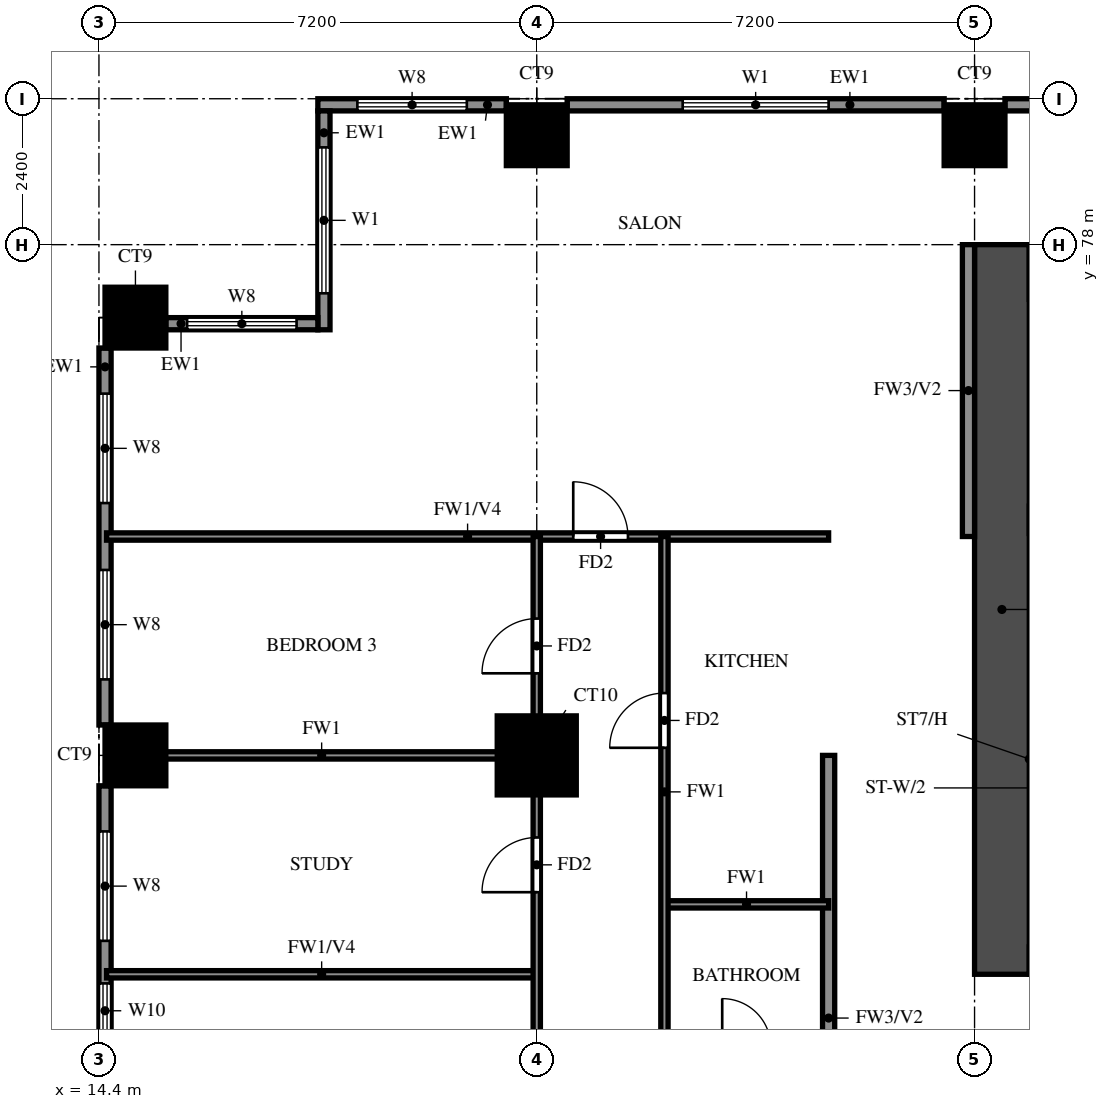
"""IFC4 building model, lengths in metres.
Left out: names, types, materials, properties, quantities, classifications, styles, units other than length and angle.
Written with IfcOpenShell. Run it as: python <this file> out.ifc"""

import sys

from ifc_helpers import new_model, si_unit, direction, frame, frame_2d, origin, origin_2d, place, context, subcontext, project, spatial, rectangle, extrude, source, transform, mapped, element, fill, save


model = new_model("IFC4")
c1 = context("Model", 3, precision=1e-05, world=origin(), true_north=direction((0.0, 1.0)))
c2 = subcontext(c1, "Body", "Model", "MODEL_VIEW")
j1 = project(units=[si_unit("LENGTHUNIT", "METRE"), si_unit("PLANEANGLEUNIT", "RADIAN")], contexts=[c1])
p1 = place(None, origin())
s1 = spatial("IfcSite", under=j1, at=p1, CompositionType="ELEMENT")
p2 = place(p1, origin())
s2 = spatial("IfcBuilding", under=s1, at=p2, CompositionType="ELEMENT")
p3 = place(p2, frame((0.0, 0.0, 65.5)))
s3 = spatial("IfcBuildingStorey", under=s2, at=p3, CompositionType="ELEMENT", Elevation=65.5)
m1 = source(origin(), c2, "Body", "SweptSolid", [
    extrude(rectangle(XDim=1.0, YDim=1.0, at=origin_2d()), origin(), (0.0, 0.0, 1.0), 3.18),
])
p4 = place(p3, frame((15.0, 69.6, 0.0), z_axis=(0.0, 0.0, 1.0), x_axis=(1.0, 0.0, 0.0)))
e1 = element("IfcColumn", 1, at=p4, inside=s3, PredefinedType="COLUMN", context=c2, shape_type="MappedRepresentation", body=[
    mapped(m1, transform((0.0, 0.0, 0.0))),
])
m2 = source(origin(), c2, "Body", "SweptSolid", [
    extrude(rectangle(XDim=1.3, YDim=1.3, at=origin_2d()), origin(), (0.0, 0.0, 1.0), 3.18),
])
p5 = place(p3, frame((21.6, 69.6, 0.0), z_axis=(0.0, 0.0, 1.0), x_axis=(1.0, 0.0, 0.0)))
e2 = element("IfcColumn", 2, at=p5, inside=s3, PredefinedType="COLUMN", context=c2, shape_type="MappedRepresentation", body=[
    mapped(m2, transform((0.0, 0.0, 0.0))),
])
for number, where, z_axis, x_axis in (
    (3, (15.0, 76.8, 0.0), (0.0, 0.0, 1.0), (1.0, 0.0, 0.0)),
    (4, (21.6, 79.8, 0.0), (0.0, 0.0, 1.0), (1.0, 0.0, 0.0)),
    (5, (28.8, 79.8, 0.0), (0.0, 0.0, 1.0), (1.0, 0.0, 0.0)),
):
    element("IfcColumn", number, at=place(p3, frame(where, z_axis=z_axis, x_axis=x_axis)), inside=s3, PredefinedType="COLUMN", context=c2, shape_type="MappedRepresentation", body=[
        mapped(m1, transform((0.0, 0.0, 0.0))),
    ])
p6 = place(p3, frame((29.25, 66.0, 0.0), z_axis=(0.0, 0.0, 1.0), x_axis=(0.0, 1.0, 0.0)))
e6 = element("IfcWall", 6, at=p6, inside=s3, PredefinedType="SHEAR", context=c2, shape_type="SweptSolid", body=[
    extrude(rectangle(XDim=12.0, YDim=0.9, at=frame_2d((6.0, 0.0))), origin(), (0.0, 0.0, 1.0), 3.18),
])
p7 = place(p3, frame((29.7, 73.475, 0.0), z_axis=(0.0, 0.0, 1.0), x_axis=(1.0, 0.0, 0.0)))
e7 = element("IfcWall", 7, at=p7, inside=s3, PredefinedType="SHEAR", context=c2, shape_type="SweptSolid", body=[
    extrude(rectangle(XDim=3.175, YDim=0.45, at=frame_2d((1.587, 0.0))), origin(), (0.0, 0.0, 1.0), 3.18),
])
p8 = place(p3, frame((35.5, 80.3, 0.0), z_axis=(0.0, 0.0, 1.0), x_axis=(-1.0, 0.0, 0.0)))
e8 = element("IfcWall", 8, at=p8, inside=s3, PredefinedType="SOLIDWALL", context=c2, shape_type="SweptSolid", body=[
    extrude(rectangle(XDim=6.2, YDim=0.2, at=frame_2d((3.1, 0.0))), origin(), (0.0, 0.0, 1.0), 3.18),
])
p9 = place(p3, frame((28.3, 80.3, 0.0), z_axis=(0.0, 0.0, 1.0), x_axis=(-1.0, 0.0, 0.0)))
e9 = element("IfcWall", 9, at=p9, inside=s3, PredefinedType="SOLIDWALL", context=c2, shape_type="SweptSolid", body=[
    extrude(rectangle(XDim=6.2, YDim=0.2, at=frame_2d((3.1, 0.0))), origin(), (0.0, 0.0, 1.0), 3.18),
])
p10 = place(p9, frame((1.9, 0.0, 0.6)))
e10 = element("IfcOpeningElement", 10, at=p10, cuts=e9, PredefinedType="OPENING", context=c2, shape_type="SweptSolid", body=[
    extrude(rectangle(XDim=2.4, YDim=2.4, at=frame_2d((1.2, 1.2))), frame((0.0, 0.11, 0.0), z_axis=(0.0, -1.0, 0.0), x_axis=(1.0, 0.0, 0.0)), (0.0, 0.0, 1.0), 0.22),
])
p11 = place(p3, frame((21.1, 80.3, 0.0), z_axis=(0.0, 0.0, 1.0), x_axis=(-1.0, 0.0, 0.0)))
e11 = element("IfcWall", 11, at=p11, inside=s3, PredefinedType="SOLIDWALL", context=c2, shape_type="SweptSolid", body=[
    extrude(rectangle(XDim=3.1, YDim=0.2, at=frame_2d((1.55, 0.0))), origin(), (0.0, 0.0, 1.0), 3.18),
])
p12 = place(p11, frame((0.65, 0.0, 0.6)))
e12 = element("IfcOpeningElement", 12, at=p12, cuts=e11, PredefinedType="OPENING", context=c2, shape_type="SweptSolid", body=[
    extrude(rectangle(XDim=1.8, YDim=2.4, at=frame_2d((0.9, 1.2))), frame((0.0, 0.11, 0.0), z_axis=(0.0, -1.0, 0.0), x_axis=(1.0, 0.0, 0.0)), (0.0, 0.0, 1.0), 0.22),
])
p13 = place(p3, frame((18.1, 80.2, 0.0), z_axis=(0.0, 0.0, 1.0), x_axis=(0.0, -1.0, 0.0)))
e13 = element("IfcWall", 13, at=p13, inside=s3, PredefinedType="SOLIDWALL", context=c2, shape_type="SweptSolid", body=[
    extrude(rectangle(XDim=3.6, YDim=0.2, at=frame_2d((1.8, 0.0))), origin(), (0.0, 0.0, 1.0), 3.18),
])
p14 = place(p13, frame((0.6, 0.0, 0.6)))
e14 = element("IfcOpeningElement", 14, at=p14, cuts=e13, PredefinedType="OPENING", context=c2, shape_type="SweptSolid", body=[
    extrude(rectangle(XDim=2.4, YDim=2.4, at=frame_2d((1.2, 1.2))), frame((0.0, 0.11, 0.0), z_axis=(0.0, -1.0, 0.0), x_axis=(1.0, 0.0, 0.0)), (0.0, 0.0, 1.0), 0.22),
])
p15 = place(p3, frame((18.0, 76.7, 0.0), z_axis=(0.0, 0.0, 1.0), x_axis=(-1.0, 0.0, 0.0)))
e15 = element("IfcWall", 15, at=p15, inside=s3, PredefinedType="SOLIDWALL", context=c2, shape_type="SweptSolid", body=[
    extrude(rectangle(XDim=2.5, YDim=0.2, at=frame_2d((1.25, 0.0))), origin(), (0.0, 0.0, 1.0), 3.18),
])
p16 = place(p15, frame((0.35, 0.0, 0.6)))
e16 = element("IfcOpeningElement", 16, at=p16, cuts=e15, PredefinedType="OPENING", context=c2, shape_type="SweptSolid", body=[
    extrude(rectangle(XDim=1.8, YDim=2.4, at=frame_2d((0.9, 1.2))), frame((0.0, 0.11, 0.0), z_axis=(0.0, -1.0, 0.0), x_axis=(1.0, 0.0, 0.0)), (0.0, 0.0, 1.0), 0.22),
])
p17 = place(p3, frame((14.5, 76.3, 0.0), z_axis=(0.0, 0.0, 1.0), x_axis=(0.0, -1.0, 0.0)))
e17 = element("IfcWall", 17, at=p17, inside=s3, PredefinedType="SOLIDWALL", context=c2, shape_type="SweptSolid", body=[
    extrude(rectangle(XDim=6.2, YDim=0.2, at=frame_2d((3.1, 0.0))), origin(), (0.0, 0.0, 1.0), 3.18),
])
p18 = place(p17, frame((3.65, 0.0, 0.6)))
e18 = element("IfcOpeningElement", 18, at=p18, cuts=e17, PredefinedType="OPENING", context=c2, shape_type="SweptSolid", body=[
    extrude(rectangle(XDim=1.8, YDim=2.4, at=frame_2d((0.9, 1.2))), frame((0.0, 0.11, 0.0), z_axis=(0.0, -1.0, 0.0), x_axis=(1.0, 0.0, 0.0)), (0.0, 0.0, 1.0), 0.22),
])
p19 = place(p17, frame((0.75, 0.0, 0.6)))
e19 = element("IfcOpeningElement", 19, at=p19, cuts=e17, PredefinedType="OPENING", context=c2, shape_type="SweptSolid", body=[
    extrude(rectangle(XDim=1.8, YDim=2.4, at=frame_2d((0.9, 1.2))), frame((0.0, 0.11, 0.0), z_axis=(0.0, -1.0, 0.0), x_axis=(1.0, 0.0, 0.0)), (0.0, 0.0, 1.0), 0.22),
])
p20 = place(p3, frame((14.5, 69.1, 0.0), z_axis=(0.0, 0.0, 1.0), x_axis=(0.0, -1.0, 0.0)))
e20 = element("IfcWall", 20, at=p20, inside=s3, PredefinedType="SOLIDWALL", context=c2, shape_type="SweptSolid", body=[
    extrude(rectangle(XDim=6.2, YDim=0.2, at=frame_2d((3.1, 0.0))), origin(), (0.0, 0.0, 1.0), 3.18),
])
p21 = place(p20, frame((3.25, 0.0, 0.6)))
e21 = element("IfcOpeningElement", 21, at=p21, cuts=e20, PredefinedType="OPENING", context=c2, shape_type="SweptSolid", body=[
    extrude(rectangle(XDim=0.9, YDim=2.4, at=frame_2d((0.45, 1.2))), frame((0.0, 0.11, 0.0), z_axis=(0.0, -1.0, 0.0), x_axis=(1.0, 0.0, 0.0)), (0.0, 0.0, 1.0), 0.22),
])
p22 = place(p20, frame((5.0, 0.0, 0.6)))
e22 = element("IfcOpeningElement", 22, at=p22, cuts=e20, PredefinedType="OPENING", context=c2, shape_type="SweptSolid", body=[
    extrude(rectangle(XDim=0.9, YDim=2.4, at=frame_2d((0.45, 1.2))), frame((0.0, 0.11, 0.0), z_axis=(0.0, -1.0, 0.0), x_axis=(1.0, 0.0, 0.0)), (0.0, 0.0, 1.0), 0.22),
])
p23 = place(p20, frame((0.75, 0.0, 0.6)))
e23 = element("IfcOpeningElement", 23, at=p23, cuts=e20, PredefinedType="OPENING", context=c2, shape_type="SweptSolid", body=[
    extrude(rectangle(XDim=1.8, YDim=2.4, at=frame_2d((0.9, 1.2))), frame((0.0, 0.11, 0.0), z_axis=(0.0, -1.0, 0.0), x_axis=(1.0, 0.0, 0.0)), (0.0, 0.0, 1.0), 0.22),
])
p24 = place(p3, frame((26.4, 60.0, 0.0), z_axis=(0.0, 0.0, 1.0), x_axis=(0.0, 1.0, 0.0)))
e24 = element("IfcWall", 24, at=p24, inside=s3, PredefinedType="SOLIDWALL", context=c2, shape_type="SweptSolid", body=[
    extrude(rectangle(XDim=9.6, YDim=0.2, at=frame_2d((4.8, 0.0))), origin(), (0.0, 0.0, 1.0), 3.18),
])
p25 = place(p24, frame((0.7, 0.0, 0.0)))
e25 = element("IfcOpeningElement", 25, at=p25, cuts=e24, PredefinedType="OPENING", context=c2, shape_type="SweptSolid", body=[
    extrude(rectangle(XDim=1.0, YDim=2.1, at=frame_2d((0.5, 1.05))), frame((0.0, 0.11, 0.0), z_axis=(0.0, -1.0, 0.0), x_axis=(1.0, 0.0, 0.0)), (0.0, 0.0, 1.0), 0.22),
])
p26 = place(p24, frame((3.1, 0.0, 0.0)))
e26 = element("IfcOpeningElement", 26, at=p26, cuts=e24, PredefinedType="OPENING", context=c2, shape_type="SweptSolid", body=[
    extrude(rectangle(XDim=1.0, YDim=2.1, at=frame_2d((0.5, 1.05))), frame((0.0, 0.11, 0.0), z_axis=(0.0, -1.0, 0.0), x_axis=(1.0, 0.0, 0.0)), (0.0, 0.0, 1.0), 0.22),
])
p27 = place(p3, frame((28.7, 73.2, 0.0), z_axis=(0.0, 0.0, 1.0), x_axis=(0.0, 1.0, 0.0)))
e27 = element("IfcWall", 27, at=p27, inside=s3, PredefinedType="SOLIDWALL", context=c2, shape_type="SweptSolid", body=[
    extrude(rectangle(XDim=4.8, YDim=0.2, at=frame_2d((2.4, 0.0))), origin(), (0.0, 0.0, 1.0), 3.18),
])
p28 = place(p3, frame((14.525, 66.0, 0.0), z_axis=(0.0, 0.0, 1.0), x_axis=(1.0, 0.0, 0.0)))
e28 = element("IfcWall", 28, at=p28, inside=s3, PredefinedType="PARTITIONING", context=c2, shape_type="SweptSolid", body=[
    extrude(rectangle(XDim=7.075, YDim=0.12, at=frame_2d((3.538, 0.0))), origin(), (0.0, 0.0, 1.0), 2.28),
])
p29 = place(p3, frame((23.7, 67.15, 0.0), z_axis=(0.0, 0.0, 1.0), x_axis=(1.0, 0.0, 0.0)))
e29 = element("IfcWall", 29, at=p29, inside=s3, PredefinedType="PARTITIONING", context=c2, shape_type="SweptSolid", body=[
    extrude(rectangle(XDim=2.7, YDim=0.12, at=frame_2d((1.35, 0.0))), origin(), (0.0, 0.0, 1.0), 3.18),
])
p30 = place(p3, frame((14.525, 69.6, 0.0), z_axis=(0.0, 0.0, 1.0), x_axis=(1.0, 0.0, 0.0)))
e30 = element("IfcWall", 30, at=p30, inside=s3, PredefinedType="PARTITIONING", context=c2, shape_type="SweptSolid", body=[
    extrude(rectangle(XDim=7.075, YDim=0.12, at=frame_2d((3.538, 0.0))), origin(), (0.0, 0.0, 1.0), 3.18),
])
p31 = place(p3, frame((14.525, 73.2, 0.0), z_axis=(0.0, 0.0, 1.0), x_axis=(1.0, 0.0, 0.0)))
e31 = element("IfcWall", 31, at=p31, inside=s3, PredefinedType="PARTITIONING", context=c2, shape_type="SweptSolid", body=[
    extrude(rectangle(XDim=11.875, YDim=0.12, at=frame_2d((5.938, 0.0))), origin(), (0.0, 0.0, 1.0), 2.28),
])
p32 = place(p31, frame((7.675, 0.0, 0.0)))
e32 = element("IfcOpeningElement", 32, at=p32, cuts=e31, PredefinedType="OPENING", context=c2, shape_type="SweptSolid", body=[
    extrude(rectangle(XDim=0.9, YDim=2.1, at=frame_2d((0.45, 1.05))), frame((0.0, 0.07, 0.0), z_axis=(0.0, -1.0, 0.0), x_axis=(1.0, 0.0, 0.0)), (0.0, 0.0, 1.0), 0.14),
])
p33 = place(p3, frame((21.6, 33.725, 0.0), z_axis=(0.0, 0.0, 1.0), x_axis=(0.0, 1.0, 0.0)))
e33 = element("IfcWall", 33, at=p33, inside=s3, PredefinedType="PARTITIONING", context=c2, shape_type="SweptSolid", body=[
    extrude(rectangle(XDim=39.475, YDim=0.12, at=frame_2d((19.737, 0.0))), origin(), (0.0, 0.0, 1.0), 3.18),
])
p34 = place(p33, frame((7.775, 0.0, 0.0)))
e34 = element("IfcOpeningElement", 34, at=p34, cuts=e33, PredefinedType="OPENING", context=c2, shape_type="SweptSolid", body=[
    extrude(rectangle(XDim=0.9, YDim=2.1, at=frame_2d((0.45, 1.05))), frame((0.0, 0.07, 0.0), z_axis=(0.0, -1.0, 0.0), x_axis=(1.0, 0.0, 0.0)), (0.0, 0.0, 1.0), 0.14),
])
p35 = place(p33, frame((15.625, 0.0, 0.0)))
e35 = element("IfcOpeningElement", 35, at=p35, cuts=e33, PredefinedType="OPENING", context=c2, shape_type="SweptSolid", body=[
    extrude(rectangle(XDim=0.9, YDim=2.1, at=frame_2d((0.45, 1.05))), frame((0.0, 0.07, 0.0), z_axis=(0.0, -1.0, 0.0), x_axis=(1.0, 0.0, 0.0)), (0.0, 0.0, 1.0), 0.14),
])
p36 = place(p33, frame((19.225, 0.0, 0.0)))
e36 = element("IfcOpeningElement", 36, at=p36, cuts=e33, PredefinedType="OPENING", context=c2, shape_type="SweptSolid", body=[
    extrude(rectangle(XDim=0.9, YDim=2.1, at=frame_2d((0.45, 1.05))), frame((0.0, 0.07, 0.0), z_axis=(0.0, -1.0, 0.0), x_axis=(1.0, 0.0, 0.0)), (0.0, 0.0, 1.0), 0.14),
])
p37 = place(p33, frame((24.325, 0.0, 0.0)))
e37 = element("IfcOpeningElement", 37, at=p37, cuts=e33, PredefinedType="OPENING", context=c2, shape_type="SweptSolid", body=[
    extrude(rectangle(XDim=1.5, YDim=2.1, at=frame_2d((0.75, 1.05))), frame((0.0, 0.07, 0.0), z_axis=(0.0, -1.0, 0.0), x_axis=(1.0, 0.0, 0.0)), (0.0, 0.0, 1.0), 0.14),
])
p38 = place(p33, frame((30.025, 0.0, 0.0)))
e38 = element("IfcOpeningElement", 38, at=p38, cuts=e33, PredefinedType="OPENING", context=c2, shape_type="SweptSolid", body=[
    extrude(rectangle(XDim=0.9, YDim=2.1, at=frame_2d((0.45, 1.05))), frame((0.0, 0.07, 0.0), z_axis=(0.0, -1.0, 0.0), x_axis=(1.0, 0.0, 0.0)), (0.0, 0.0, 1.0), 0.14),
])
p39 = place(p33, frame((33.625, 0.0, 0.0)))
e39 = element("IfcOpeningElement", 39, at=p39, cuts=e33, PredefinedType="OPENING", context=c2, shape_type="SweptSolid", body=[
    extrude(rectangle(XDim=0.9, YDim=2.1, at=frame_2d((0.45, 1.05))), frame((0.0, 0.07, 0.0), z_axis=(0.0, -1.0, 0.0), x_axis=(1.0, 0.0, 0.0)), (0.0, 0.0, 1.0), 0.14),
])
p40 = place(p33, frame((37.225, 0.0, 0.0)))
e40 = element("IfcOpeningElement", 40, at=p40, cuts=e33, PredefinedType="OPENING", context=c2, shape_type="SweptSolid", body=[
    extrude(rectangle(XDim=0.9, YDim=2.1, at=frame_2d((0.45, 1.05))), frame((0.0, 0.07, 0.0), z_axis=(0.0, -1.0, 0.0), x_axis=(1.0, 0.0, 0.0)), (0.0, 0.0, 1.0), 0.14),
])
p41 = place(p3, frame((23.7, 64.8, 0.0), z_axis=(0.0, 0.0, 1.0), x_axis=(0.0, 1.0, 0.0)))
e41 = element("IfcWall", 41, at=p41, inside=s3, PredefinedType="PARTITIONING", context=c2, shape_type="SweptSolid", body=[
    extrude(rectangle(XDim=8.4, YDim=0.12, at=frame_2d((4.2, 0.0))), origin(), (0.0, 0.0, 1.0), 3.18),
])
p42 = place(p41, frame((4.925, 0.0, 0.0)))
e42 = element("IfcOpeningElement", 42, at=p42, cuts=e41, PredefinedType="OPENING", context=c2, shape_type="SweptSolid", body=[
    extrude(rectangle(XDim=0.9, YDim=2.1, at=frame_2d((0.45, 1.05))), frame((0.0, 0.07, 0.0), z_axis=(0.0, -1.0, 0.0), x_axis=(1.0, 0.0, 0.0)), (0.0, 0.0, 1.0), 0.14),
])
p43 = place(p10, origin())
e43 = element("IfcWindow", 43, at=p43, inside=s3, PartitioningType="DOUBLE_PANEL_VERTICAL", PredefinedType="WINDOW", context=c2, shape_type="SweptSolid", body=[
    extrude(rectangle(XDim=2.4, YDim=2.4, at=frame_2d((1.2, 1.2))), frame((0.0, 0.03, 0.0), z_axis=(0.0, -1.0, 0.0), x_axis=(1.0, 0.0, 0.0)), (0.0, 0.0, 1.0), 0.06),
])
fill(e10, e43)
p44 = place(p12, origin())
e44 = element("IfcWindow", 44, at=p44, inside=s3, PartitioningType="DOUBLE_PANEL_VERTICAL", PredefinedType="WINDOW", context=c2, shape_type="SweptSolid", body=[
    extrude(rectangle(XDim=1.8, YDim=2.4, at=frame_2d((0.9, 1.2))), frame((0.0, 0.03, 0.0), z_axis=(0.0, -1.0, 0.0), x_axis=(1.0, 0.0, 0.0)), (0.0, 0.0, 1.0), 0.06),
])
fill(e12, e44)
p45 = place(p14, origin())
e45 = element("IfcWindow", 45, at=p45, inside=s3, PartitioningType="DOUBLE_PANEL_VERTICAL", PredefinedType="WINDOW", context=c2, shape_type="SweptSolid", body=[
    extrude(rectangle(XDim=2.4, YDim=2.4, at=frame_2d((1.2, 1.2))), frame((0.0, 0.03, 0.0), z_axis=(0.0, -1.0, 0.0), x_axis=(1.0, 0.0, 0.0)), (0.0, 0.0, 1.0), 0.06),
])
fill(e14, e45)
p46 = place(p16, origin())
e46 = element("IfcWindow", 46, at=p46, inside=s3, PartitioningType="DOUBLE_PANEL_VERTICAL", PredefinedType="WINDOW", context=c2, shape_type="SweptSolid", body=[
    extrude(rectangle(XDim=1.8, YDim=2.4, at=frame_2d((0.9, 1.2))), frame((0.0, 0.03, 0.0), z_axis=(0.0, -1.0, 0.0), x_axis=(1.0, 0.0, 0.0)), (0.0, 0.0, 1.0), 0.06),
])
fill(e16, e46)
p47 = place(p18, origin())
e47 = element("IfcWindow", 47, at=p47, inside=s3, PartitioningType="DOUBLE_PANEL_VERTICAL", PredefinedType="WINDOW", context=c2, shape_type="SweptSolid", body=[
    extrude(rectangle(XDim=1.8, YDim=2.4, at=frame_2d((0.9, 1.2))), frame((0.0, 0.03, 0.0), z_axis=(0.0, -1.0, 0.0), x_axis=(1.0, 0.0, 0.0)), (0.0, 0.0, 1.0), 0.06),
])
fill(e18, e47)
p48 = place(p19, origin())
e48 = element("IfcWindow", 48, at=p48, inside=s3, PartitioningType="DOUBLE_PANEL_VERTICAL", PredefinedType="WINDOW", context=c2, shape_type="SweptSolid", body=[
    extrude(rectangle(XDim=1.8, YDim=2.4, at=frame_2d((0.9, 1.2))), frame((0.0, 0.03, 0.0), z_axis=(0.0, -1.0, 0.0), x_axis=(1.0, 0.0, 0.0)), (0.0, 0.0, 1.0), 0.06),
])
fill(e19, e48)
p49 = place(p21, origin())
e49 = element("IfcWindow", 49, at=p49, inside=s3, PartitioningType="SINGLE_PANEL", PredefinedType="WINDOW", context=c2, shape_type="SweptSolid", body=[
    extrude(rectangle(XDim=0.9, YDim=2.4, at=frame_2d((0.45, 1.2))), frame((0.0, 0.03, 0.0), z_axis=(0.0, -1.0, 0.0), x_axis=(1.0, 0.0, 0.0)), (0.0, 0.0, 1.0), 0.06),
])
fill(e21, e49)
p50 = place(p23, origin())
e50 = element("IfcWindow", 50, at=p50, inside=s3, PartitioningType="DOUBLE_PANEL_VERTICAL", PredefinedType="WINDOW", context=c2, shape_type="SweptSolid", body=[
    extrude(rectangle(XDim=1.8, YDim=2.4, at=frame_2d((0.9, 1.2))), frame((0.0, 0.03, 0.0), z_axis=(0.0, -1.0, 0.0), x_axis=(1.0, 0.0, 0.0)), (0.0, 0.0, 1.0), 0.06),
])
fill(e23, e50)
p51 = place(p39, origin())
e51 = element("IfcDoor", 51, at=p51, inside=s3, OperationType="SINGLE_SWING_LEFT", PredefinedType="DOOR", context=c2, shape_type="SweptSolid", body=[
    extrude(rectangle(XDim=0.9, YDim=2.1, at=frame_2d((0.45, 1.05))), frame((0.0, 0.025, 0.0), z_axis=(0.0, -1.0, 0.0), x_axis=(1.0, 0.0, 0.0)), (0.0, 0.0, 1.0), 0.05),
])
fill(e39, e51)
p52 = place(p40, origin())
e52 = element("IfcDoor", 52, at=p52, inside=s3, OperationType="SINGLE_SWING_RIGHT", PredefinedType="DOOR", context=c2, shape_type="SweptSolid", body=[
    extrude(rectangle(XDim=0.9, YDim=2.1, at=frame_2d((0.45, 1.05))), frame((0.0, 0.025, 0.0), z_axis=(0.0, -1.0, 0.0), x_axis=(1.0, 0.0, 0.0)), (0.0, 0.0, 1.0), 0.05),
])
fill(e40, e52)
p53 = place(p32, origin())
e53 = element("IfcDoor", 53, at=p53, inside=s3, OperationType="SINGLE_SWING_LEFT", PredefinedType="DOOR", context=c2, shape_type="SweptSolid", body=[
    extrude(rectangle(XDim=0.9, YDim=2.1, at=frame_2d((0.45, 1.05))), frame((0.0, 0.025, 0.0), z_axis=(0.0, -1.0, 0.0), x_axis=(1.0, 0.0, 0.0)), (0.0, 0.0, 1.0), 0.05),
])
fill(e32, e53)
p54 = place(p42, origin())
e54 = element("IfcDoor", 54, at=p54, inside=s3, OperationType="SINGLE_SWING_RIGHT", PredefinedType="DOOR", context=c2, shape_type="SweptSolid", body=[
    extrude(rectangle(XDim=0.9, YDim=2.1, at=frame_2d((0.45, 1.05))), frame((0.0, 0.025, 0.0), z_axis=(0.0, -1.0, 0.0), x_axis=(1.0, 0.0, 0.0)), (0.0, 0.0, 1.0), 0.05),
])
fill(e42, e54)
save(model, sys.argv[1])
